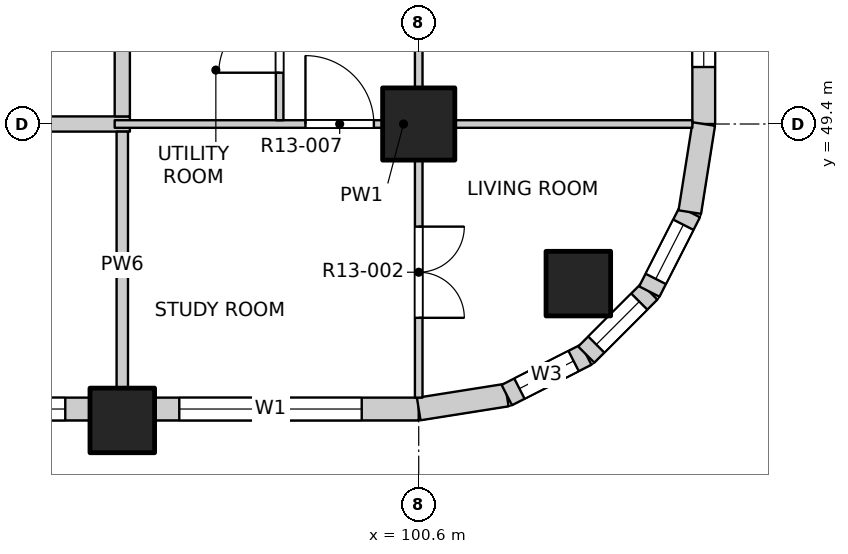
"""IFC4 building model, lengths in metres.
Left out: names, types, materials, properties, quantities, classifications, styles, units other than length and angle.
Written with IfcOpenShell. Run it as: python <this file> out.ifc"""

import sys

from ifc_helpers import new_model, si_unit, direction, frame, frame_2d, origin, origin_2d, place, context, subcontext, project, spatial, rectangle, extrude, element, fill, save


model = new_model("IFC4")
c1 = context("Model", 3, precision=1e-05, world=origin(), true_north=direction((0.0, 1.0)))
c2 = subcontext(c1, "Body", "Model", "MODEL_VIEW")
j1 = project(units=[si_unit("LENGTHUNIT", "METRE"), si_unit("PLANEANGLEUNIT", "RADIAN")], contexts=[c1])
p1 = place(None, origin())
s1 = spatial("IfcSite", under=j1, at=p1, CompositionType="ELEMENT")
p2 = place(p1, origin())
s2 = spatial("IfcBuilding", under=s1, at=p2, CompositionType="ELEMENT")
p3 = place(p2, frame((0.0, 0.0, 140.7)))
s3 = spatial("IfcBuildingStorey", under=s2, at=p3, CompositionType="ELEMENT", Elevation=140.7)
for number, where, z_axis, x_axis in (
    (1, (102.7, 47.3, -0.25), (0.0, 0.0, 1.0), (1.0, 0.0, 0.0)),
    (2, (96.7, 45.5, -0.25), (0.0, 0.0, 1.0), (1.0, 0.0, 0.0)),
):
    element("IfcColumn", number, at=place(p3, frame(where, z_axis=z_axis, x_axis=x_axis)), inside=s3, PredefinedType="COLUMN", context=c2, shape_type="SweptSolid", body=[
        extrude(rectangle(XDim=0.85, YDim=0.85, at=origin_2d()), origin(), (0.0, 0.0, 1.0), 3.35),
    ])
p4 = place(p3, frame((100.6, 49.4, -0.25), z_axis=(0.0, 0.0, 1.0), x_axis=(1.0, 0.0, 0.0)))
e3 = element("IfcColumn", 3, at=p4, inside=s3, PredefinedType="COLUMN", context=c2, shape_type="SweptSolid", body=[
    extrude(rectangle(XDim=0.95, YDim=0.95, at=origin_2d()), origin(), (0.0, 0.0, 1.0), 3.35),
])
p5 = place(p3, frame((89.325, 45.65, 0.0), z_axis=(0.0, 0.0, 1.0), x_axis=(1.0, 0.0, 0.0)))
e4 = element("IfcWall", 4, at=p5, inside=s3, PredefinedType="SOLIDWALL", context=c2, shape_type="SweptSolid", body=[
    extrude(rectangle(XDim=6.95, YDim=0.3, at=frame_2d((3.475, 0.0))), origin(), (0.0, 0.0, 1.0), 3.1),
])
p6 = place(p5, frame((0.325, 0.0, 0.9)))
e5 = element("IfcOpeningElement", 5, at=p6, cuts=e4, PredefinedType="OPENING", context=c2, shape_type="SweptSolid", body=[
    extrude(rectangle(XDim=2.4, YDim=1.8, at=frame_2d((1.2, 0.9))), frame((0.0, 0.16, 0.0), z_axis=(0.0, -1.0, 0.0), x_axis=(1.0, 0.0, 0.0)), (0.0, 0.0, 1.0), 0.32),
])
p7 = place(p5, frame((4.225, 0.0, 0.9)))
e6 = element("IfcOpeningElement", 6, at=p7, cuts=e4, PredefinedType="OPENING", context=c2, shape_type="SweptSolid", body=[
    extrude(rectangle(XDim=2.4, YDim=1.8, at=frame_2d((1.2, 0.9))), frame((0.0, 0.16, 0.0), z_axis=(0.0, -1.0, 0.0), x_axis=(1.0, 0.0, 0.0)), (0.0, 0.0, 1.0), 0.32),
])
p8 = place(p3, frame((97.125, 45.65, 0.0), z_axis=(0.0, 0.0, 1.0), x_axis=(1.0, 0.0, 0.0)))
e7 = element("IfcWall", 7, at=p8, inside=s3, PredefinedType="SOLIDWALL", context=c2, shape_type="SweptSolid", body=[
    extrude(rectangle(XDim=3.475, YDim=0.3, at=frame_2d((1.738, 0.0))), origin(), (0.0, 0.0, 1.0), 3.1),
])
p9 = place(p8, frame((0.325, 0.0, 0.9)))
e8 = element("IfcOpeningElement", 8, at=p9, cuts=e7, PredefinedType="OPENING", context=c2, shape_type="SweptSolid", body=[
    extrude(rectangle(XDim=2.4, YDim=1.8, at=frame_2d((1.2, 0.9))), frame((0.0, 0.16, 0.0), z_axis=(0.0, -1.0, 0.0), x_axis=(1.0, 0.0, 0.0)), (0.0, 0.0, 1.0), 0.32),
])
p10 = place(p3, frame((104.35, 49.4, 0.0), z_axis=(0.0, 0.0, 1.0), x_axis=(0.0, 1.0, 0.0)))
e9 = element("IfcWall", 9, at=p10, inside=s3, PredefinedType="SOLIDWALL", context=c2, shape_type="SweptSolid", body=[
    extrude(rectangle(XDim=3.475, YDim=0.3, at=frame_2d((1.738, 0.0))), origin(), (0.0, 0.0, 1.0), 3.1),
])
p11 = place(p10, frame((0.75, 0.0, 0.9)))
e10 = element("IfcOpeningElement", 10, at=p11, cuts=e9, PredefinedType="OPENING", context=c2, shape_type="SweptSolid", body=[
    extrude(rectangle(XDim=2.4, YDim=1.8, at=frame_2d((1.2, 0.9))), frame((0.0, 0.16, 0.0), z_axis=(0.0, -1.0, 0.0), x_axis=(1.0, 0.0, 0.0)), (0.0, 0.0, 1.0), 0.32),
])
p12 = place(p3, frame((100.6, 45.65, 0.0), z_axis=(0.0, 0.0, 1.0), x_axis=(0.987678452879, 0.156496880861, 0.0)))
e11 = element("IfcWall", 11, at=p12, inside=s3, PredefinedType="SOLIDWALL", context=c2, shape_type="SweptSolid", body=[
    extrude(rectangle(XDim=1.173, YDim=0.3, at=frame_2d((0.586, 0.0))), origin(), (0.0, 0.0, 1.0), 3.1),
])
p13 = place(p3, frame((101.759, 45.833, 0.0), z_axis=(0.0, 0.0, 1.0), x_axis=(0.890988677504, 0.454025524128, 0.0)))
e12 = element("IfcWall", 12, at=p13, inside=s3, PredefinedType="SOLIDWALL", context=c2, shape_type="SweptSolid", body=[
    extrude(rectangle(XDim=1.173, YDim=0.3, at=frame_2d((0.587, 0.0))), origin(), (0.0, 0.0, 1.0), 3.1),
])
p14 = place(p13, frame((0.187, 0.0, 0.9)))
e13 = element("IfcOpeningElement", 13, at=p14, cuts=e12, PredefinedType="OPENING", context=c2, shape_type="SweptSolid", body=[
    extrude(rectangle(XDim=0.8, YDim=1.2, at=frame_2d((0.4, 0.6))), frame((0.0, 0.16, 0.0), z_axis=(0.0, -1.0, 0.0), x_axis=(1.0, 0.0, 0.0)), (0.0, 0.0, 1.0), 0.32),
])
p15 = place(p3, frame((102.804, 46.366, 0.0), z_axis=(0.0, 0.0, 1.0), x_axis=(0.707106781187, 0.707106781187, 0.0)))
e14 = element("IfcWall", 14, at=p15, inside=s3, PredefinedType="SOLIDWALL", context=c2, shape_type="SweptSolid", body=[
    extrude(rectangle(XDim=1.173, YDim=0.3, at=frame_2d((0.586, 0.0))), origin(), (0.0, 0.0, 1.0), 3.1),
])
p16 = place(p15, frame((0.187, 0.0, 0.9)))
e15 = element("IfcOpeningElement", 15, at=p16, cuts=e14, PredefinedType="OPENING", context=c2, shape_type="SweptSolid", body=[
    extrude(rectangle(XDim=0.8, YDim=1.2, at=frame_2d((0.4, 0.6))), frame((0.0, 0.16, 0.0), z_axis=(0.0, -1.0, 0.0), x_axis=(1.0, 0.0, 0.0)), (0.0, 0.0, 1.0), 0.32),
])
p17 = place(p3, frame((103.634, 47.196, 0.0), z_axis=(0.0, 0.0, 1.0), x_axis=(0.454025524128, 0.890988677504, 0.0)))
e16 = element("IfcWall", 16, at=p17, inside=s3, PredefinedType="SOLIDWALL", context=c2, shape_type="SweptSolid", body=[
    extrude(rectangle(XDim=1.173, YDim=0.3, at=frame_2d((0.587, 0.0))), origin(), (0.0, 0.0, 1.0), 3.1),
])
p18 = place(p17, frame((0.187, 0.0, 0.9)))
e17 = element("IfcOpeningElement", 17, at=p18, cuts=e16, PredefinedType="OPENING", context=c2, shape_type="SweptSolid", body=[
    extrude(rectangle(XDim=0.8, YDim=1.2, at=frame_2d((0.4, 0.6))), frame((0.0, 0.16, 0.0), z_axis=(0.0, -1.0, 0.0), x_axis=(1.0, 0.0, 0.0)), (0.0, 0.0, 1.0), 0.32),
])
p19 = place(p3, frame((104.167, 48.241, 0.0), z_axis=(0.0, 0.0, 1.0), x_axis=(0.156496880861, 0.987678452879, 0.0)))
e18 = element("IfcWall", 18, at=p19, inside=s3, PredefinedType="SOLIDWALL", context=c2, shape_type="SweptSolid", body=[
    extrude(rectangle(XDim=1.173, YDim=0.3, at=frame_2d((0.586, 0.0))), origin(), (0.0, 0.0, 1.0), 3.1),
])
p20 = place(p3, frame((73.2, 49.4, 0.0), z_axis=(0.0, 0.0, 1.0), x_axis=(1.0, 0.0, 0.0)))
e19 = element("IfcWall", 19, at=p20, inside=s3, PredefinedType="PARTITIONING", context=c2, shape_type="SweptSolid", body=[
    extrude(rectangle(XDim=23.6, YDim=0.2, at=frame_2d((11.8, 0.0))), origin(), (0.0, 0.0, 1.0), 3.1),
])
p21 = place(p20, frame((2.225, 0.0, 0.0)))
e20 = element("IfcOpeningElement", 20, at=p21, cuts=e19, PredefinedType="OPENING", context=c2, shape_type="SweptSolid", body=[
    extrude(rectangle(XDim=1.2, YDim=2.1, at=frame_2d((0.6, 1.05))), frame((0.0, 0.11, 0.0), z_axis=(0.0, -1.0, 0.0), x_axis=(1.0, 0.0, 0.0)), (0.0, 0.0, 1.0), 0.22),
])
p22 = place(p20, frame((12.375, 0.0, 0.0)))
e21 = element("IfcOpeningElement", 21, at=p22, cuts=e19, PredefinedType="OPENING", context=c2, shape_type="SweptSolid", body=[
    extrude(rectangle(XDim=1.2, YDim=2.1, at=frame_2d((0.6, 1.05))), frame((0.0, 0.11, 0.0), z_axis=(0.0, -1.0, 0.0), x_axis=(1.0, 0.0, 0.0)), (0.0, 0.0, 1.0), 0.22),
])
p23 = place(p20, frame((20.175, 0.0, 0.0)))
e22 = element("IfcOpeningElement", 22, at=p23, cuts=e19, PredefinedType="OPENING", context=c2, shape_type="SweptSolid", body=[
    extrude(rectangle(XDim=1.2, YDim=2.1, at=frame_2d((0.6, 1.05))), frame((0.0, 0.11, 0.0), z_axis=(0.0, -1.0, 0.0), x_axis=(1.0, 0.0, 0.0)), (0.0, 0.0, 1.0), 0.22),
])
p24 = place(p3, frame((96.6, 49.4, 0.0), z_axis=(0.0, 0.0, 1.0), x_axis=(1.0, 0.0, 0.0)))
e23 = element("IfcWall", 23, at=p24, inside=s3, PredefinedType="PARTITIONING", context=c2, shape_type="SweptSolid", body=[
    extrude(rectangle(XDim=7.6, YDim=0.1, at=frame_2d((3.8, 0.0))), origin(), (0.0, 0.0, 1.0), 3.1),
])
p25 = place(p24, frame((2.51, 0.0, 0.0)))
e24 = element("IfcOpeningElement", 24, at=p25, cuts=e23, PredefinedType="OPENING", context=c2, shape_type="SweptSolid", body=[
    extrude(rectangle(XDim=0.9, YDim=2.1, at=frame_2d((0.45, 1.05))), frame((0.0, 0.06, 0.0), z_axis=(0.0, -1.0, 0.0), x_axis=(1.0, 0.0, 0.0)), (0.0, 0.0, 1.0), 0.12),
])
p26 = place(p3, frame((96.7, 45.8, 0.0), z_axis=(0.0, 0.0, 1.0), x_axis=(0.0, 1.0, 0.0)))
e25 = element("IfcWall", 25, at=p26, inside=s3, PredefinedType="PARTITIONING", context=c2, shape_type="SweptSolid", body=[
    extrude(rectangle(XDim=3.5, YDim=0.15, at=frame_2d((1.75, 0.0))), origin(), (0.0, 0.0, 1.0), 3.1),
])
p27 = place(p3, frame((96.7, 49.5, 0.0), z_axis=(0.0, 0.0, 1.0), x_axis=(0.0, 1.0, 0.0)))
e26 = element("IfcWall", 26, at=p27, inside=s3, PredefinedType="PARTITIONING", context=c2, shape_type="SweptSolid", body=[
    extrude(rectangle(XDim=34.7, YDim=0.2, at=frame_2d((17.35, 0.0))), origin(), (0.0, 0.0, 1.0), 3.1),
])
p28 = place(p27, frame((3.675, 0.0, 0.0)))
e27 = element("IfcOpeningElement", 27, at=p28, cuts=e26, PredefinedType="OPENING", context=c2, shape_type="SweptSolid", body=[
    extrude(rectangle(XDim=1.0, YDim=2.1, at=frame_2d((0.5, 1.05))), frame((0.0, 0.11, 0.0), z_axis=(0.0, -1.0, 0.0), x_axis=(1.0, 0.0, 0.0)), (0.0, 0.0, 1.0), 0.22),
])
p29 = place(p27, frame((21.725, 0.0, 0.0)))
e28 = element("IfcOpeningElement", 28, at=p29, cuts=e26, PredefinedType="OPENING", context=c2, shape_type="SweptSolid", body=[
    extrude(rectangle(XDim=1.0, YDim=2.1, at=frame_2d((0.5, 1.05))), frame((0.0, 0.11, 0.0), z_axis=(0.0, -1.0, 0.0), x_axis=(1.0, 0.0, 0.0)), (0.0, 0.0, 1.0), 0.22),
])
p30 = place(p27, frame((29.125, 0.0, 0.0)))
e29 = element("IfcOpeningElement", 29, at=p30, cuts=e26, PredefinedType="OPENING", context=c2, shape_type="SweptSolid", body=[
    extrude(rectangle(XDim=1.0, YDim=2.1, at=frame_2d((0.5, 1.05))), frame((0.0, 0.11, 0.0), z_axis=(0.0, -1.0, 0.0), x_axis=(1.0, 0.0, 0.0)), (0.0, 0.0, 1.0), 0.22),
])
p31 = place(p3, frame((98.77, 49.45, 0.0), z_axis=(0.0, 0.0, 1.0), x_axis=(0.0, 1.0, 0.0)))
e30 = element("IfcWall", 30, at=p31, inside=s3, PredefinedType="PARTITIONING", context=c2, shape_type="SweptSolid", body=[
    extrude(rectangle(XDim=4.85, YDim=0.1, at=frame_2d((2.425, 0.0))), origin(), (0.0, 0.0, 1.0), 3.1),
])
p32 = place(p31, frame((0.625, 0.0, 0.0)))
e31 = element("IfcOpeningElement", 31, at=p32, cuts=e30, PredefinedType="OPENING", context=c2, shape_type="SweptSolid", body=[
    extrude(rectangle(XDim=0.8, YDim=2.1, at=frame_2d((0.4, 1.05))), frame((0.0, 0.06, 0.0), z_axis=(0.0, -1.0, 0.0), x_axis=(1.0, 0.0, 0.0)), (0.0, 0.0, 1.0), 0.12),
])
p33 = place(p31, frame((3.05, 0.0, 0.0)))
e32 = element("IfcOpeningElement", 32, at=p33, cuts=e30, PredefinedType="OPENING", context=c2, shape_type="SweptSolid", body=[
    extrude(rectangle(XDim=0.9, YDim=2.1, at=frame_2d((0.45, 1.05))), frame((0.0, 0.06, 0.0), z_axis=(0.0, -1.0, 0.0), x_axis=(1.0, 0.0, 0.0)), (0.0, 0.0, 1.0), 0.12),
])
p34 = place(p3, frame((100.6, 45.8, 0.0), z_axis=(0.0, 0.0, 1.0), x_axis=(0.0, 1.0, 0.0)))
e33 = element("IfcWall", 33, at=p34, inside=s3, PredefinedType="PARTITIONING", context=c2, shape_type="SweptSolid", body=[
    extrude(rectangle(XDim=38.4, YDim=0.1, at=frame_2d((19.2, 0.0))), origin(), (0.0, 0.0, 1.0), 3.1),
])
p35 = place(p34, frame((1.05, 0.0, 0.0)))
e34 = element("IfcOpeningElement", 34, at=p35, cuts=e33, PredefinedType="OPENING", context=c2, shape_type="SweptSolid", body=[
    extrude(rectangle(XDim=1.2, YDim=2.1, at=frame_2d((0.6, 1.05))), frame((0.0, 0.06, 0.0), z_axis=(0.0, -1.0, 0.0), x_axis=(1.0, 0.0, 0.0)), (0.0, 0.0, 1.0), 0.12),
])
p36 = place(p34, frame((5.1, 0.0, 0.0)))
e35 = element("IfcOpeningElement", 35, at=p36, cuts=e33, PredefinedType="OPENING", context=c2, shape_type="SweptSolid", body=[
    extrude(rectangle(XDim=0.9, YDim=2.1, at=frame_2d((0.45, 1.05))), frame((0.0, 0.06, 0.0), z_axis=(0.0, -1.0, 0.0), x_axis=(1.0, 0.0, 0.0)), (0.0, 0.0, 1.0), 0.12),
])
p37 = place(p34, frame((9.0, 0.0, 0.0)))
e36 = element("IfcOpeningElement", 36, at=p37, cuts=e33, PredefinedType="OPENING", context=c2, shape_type="SweptSolid", body=[
    extrude(rectangle(XDim=0.9, YDim=2.1, at=frame_2d((0.45, 1.05))), frame((0.0, 0.06, 0.0), z_axis=(0.0, -1.0, 0.0), x_axis=(1.0, 0.0, 0.0)), (0.0, 0.0, 1.0), 0.12),
])
p38 = place(p34, frame((12.9, 0.0, 0.0)))
e37 = element("IfcOpeningElement", 37, at=p38, cuts=e33, PredefinedType="OPENING", context=c2, shape_type="SweptSolid", body=[
    extrude(rectangle(XDim=0.9, YDim=2.1, at=frame_2d((0.45, 1.05))), frame((0.0, 0.06, 0.0), z_axis=(0.0, -1.0, 0.0), x_axis=(1.0, 0.0, 0.0)), (0.0, 0.0, 1.0), 0.12),
])
p39 = place(p34, frame((16.8, 0.0, 0.0)))
e38 = element("IfcOpeningElement", 38, at=p39, cuts=e33, PredefinedType="OPENING", context=c2, shape_type="SweptSolid", body=[
    extrude(rectangle(XDim=0.9, YDim=2.1, at=frame_2d((0.45, 1.05))), frame((0.0, 0.06, 0.0), z_axis=(0.0, -1.0, 0.0), x_axis=(1.0, 0.0, 0.0)), (0.0, 0.0, 1.0), 0.12),
])
p40 = place(p34, frame((20.7, 0.0, 0.0)))
e39 = element("IfcOpeningElement", 39, at=p40, cuts=e33, PredefinedType="OPENING", context=c2, shape_type="SweptSolid", body=[
    extrude(rectangle(XDim=0.9, YDim=2.1, at=frame_2d((0.45, 1.05))), frame((0.0, 0.06, 0.0), z_axis=(0.0, -1.0, 0.0), x_axis=(1.0, 0.0, 0.0)), (0.0, 0.0, 1.0), 0.12),
])
p41 = place(p34, frame((24.6, 0.0, 0.0)))
e40 = element("IfcOpeningElement", 40, at=p41, cuts=e33, PredefinedType="OPENING", context=c2, shape_type="SweptSolid", body=[
    extrude(rectangle(XDim=0.9, YDim=2.1, at=frame_2d((0.45, 1.05))), frame((0.0, 0.06, 0.0), z_axis=(0.0, -1.0, 0.0), x_axis=(1.0, 0.0, 0.0)), (0.0, 0.0, 1.0), 0.12),
])
p42 = place(p34, frame((28.5, 0.0, 0.0)))
e41 = element("IfcOpeningElement", 41, at=p42, cuts=e33, PredefinedType="OPENING", context=c2, shape_type="SweptSolid", body=[
    extrude(rectangle(XDim=0.9, YDim=2.1, at=frame_2d((0.45, 1.05))), frame((0.0, 0.06, 0.0), z_axis=(0.0, -1.0, 0.0), x_axis=(1.0, 0.0, 0.0)), (0.0, 0.0, 1.0), 0.12),
])
p43 = place(p34, frame((32.4, 0.0, 0.0)))
e42 = element("IfcOpeningElement", 42, at=p43, cuts=e33, PredefinedType="OPENING", context=c2, shape_type="SweptSolid", body=[
    extrude(rectangle(XDim=0.9, YDim=2.1, at=frame_2d((0.45, 1.05))), frame((0.0, 0.06, 0.0), z_axis=(0.0, -1.0, 0.0), x_axis=(1.0, 0.0, 0.0)), (0.0, 0.0, 1.0), 0.12),
])
p44 = place(p34, frame((36.15, 0.0, 0.0)))
e43 = element("IfcOpeningElement", 43, at=p44, cuts=e33, PredefinedType="OPENING", context=c2, shape_type="SweptSolid", body=[
    extrude(rectangle(XDim=1.2, YDim=2.1, at=frame_2d((0.6, 1.05))), frame((0.0, 0.06, 0.0), z_axis=(0.0, -1.0, 0.0), x_axis=(1.0, 0.0, 0.0)), (0.0, 0.0, 1.0), 0.12),
])
p45 = place(p7, origin())
e44 = element("IfcWindow", 44, at=p45, inside=s3, PartitioningType="DOUBLE_PANEL_VERTICAL", PredefinedType="WINDOW", context=c2, shape_type="SweptSolid", body=[
    extrude(rectangle(XDim=2.4, YDim=1.8, at=frame_2d((1.2, 0.9))), frame((0.0, 0.03, 0.0), z_axis=(0.0, -1.0, 0.0), x_axis=(1.0, 0.0, 0.0)), (0.0, 0.0, 1.0), 0.06),
])
fill(e6, e44)
p46 = place(p9, origin())
e45 = element("IfcWindow", 45, at=p46, inside=s3, PartitioningType="DOUBLE_PANEL_VERTICAL", PredefinedType="WINDOW", context=c2, shape_type="SweptSolid", body=[
    extrude(rectangle(XDim=2.4, YDim=1.8, at=frame_2d((1.2, 0.9))), frame((0.0, 0.03, 0.0), z_axis=(0.0, -1.0, 0.0), x_axis=(1.0, 0.0, 0.0)), (0.0, 0.0, 1.0), 0.06),
])
fill(e8, e45)
p47 = place(p11, origin())
e46 = element("IfcWindow", 46, at=p47, inside=s3, PartitioningType="DOUBLE_PANEL_VERTICAL", PredefinedType="WINDOW", context=c2, shape_type="SweptSolid", body=[
    extrude(rectangle(XDim=2.4, YDim=1.8, at=frame_2d((1.2, 0.9))), frame((0.0, 0.03, 0.0), z_axis=(0.0, -1.0, 0.0), x_axis=(1.0, 0.0, 0.0)), (0.0, 0.0, 1.0), 0.06),
])
fill(e10, e46)
p48 = place(p14, origin())
e47 = element("IfcWindow", 47, at=p48, inside=s3, PartitioningType="SINGLE_PANEL", PredefinedType="WINDOW", context=c2, shape_type="SweptSolid", body=[
    extrude(rectangle(XDim=0.8, YDim=1.2, at=frame_2d((0.4, 0.6))), frame((0.0, 0.03, 0.0), z_axis=(0.0, -1.0, 0.0), x_axis=(1.0, 0.0, 0.0)), (0.0, 0.0, 1.0), 0.06),
])
fill(e13, e47)
p49 = place(p16, origin())
e48 = element("IfcWindow", 48, at=p49, inside=s3, PartitioningType="SINGLE_PANEL", PredefinedType="WINDOW", context=c2, shape_type="SweptSolid", body=[
    extrude(rectangle(XDim=0.8, YDim=1.2, at=frame_2d((0.4, 0.6))), frame((0.0, 0.03, 0.0), z_axis=(0.0, -1.0, 0.0), x_axis=(1.0, 0.0, 0.0)), (0.0, 0.0, 1.0), 0.06),
])
fill(e15, e48)
p50 = place(p18, origin())
e49 = element("IfcWindow", 49, at=p50, inside=s3, PartitioningType="SINGLE_PANEL", PredefinedType="WINDOW", context=c2, shape_type="SweptSolid", body=[
    extrude(rectangle(XDim=0.8, YDim=1.2, at=frame_2d((0.4, 0.6))), frame((0.0, 0.03, 0.0), z_axis=(0.0, -1.0, 0.0), x_axis=(1.0, 0.0, 0.0)), (0.0, 0.0, 1.0), 0.06),
])
fill(e17, e49)
p51 = place(p35, origin())
e50 = element("IfcDoor", 50, at=p51, inside=s3, OperationType="DOUBLE_DOOR_SINGLE_SWING", PredefinedType="DOOR", context=c2, shape_type="SweptSolid", body=[
    extrude(rectangle(XDim=1.2, YDim=2.1, at=frame_2d((0.6, 1.05))), frame((0.0, 0.025, 0.0), z_axis=(0.0, -1.0, 0.0), x_axis=(1.0, 0.0, 0.0)), (0.0, 0.0, 1.0), 0.05),
])
fill(e34, e50)
p52 = place(p25, origin())
e51 = element("IfcDoor", 51, at=p52, inside=s3, OperationType="SINGLE_SWING_LEFT", PredefinedType="DOOR", context=c2, shape_type="SweptSolid", body=[
    extrude(rectangle(XDim=0.9, YDim=2.1, at=frame_2d((0.45, 1.05))), frame((0.0, 0.025, 0.0), z_axis=(0.0, -1.0, 0.0), x_axis=(1.0, 0.0, 0.0)), (0.0, 0.0, 1.0), 0.05),
])
fill(e24, e51)
p53 = place(p32, origin())
e52 = element("IfcDoor", 52, at=p53, inside=s3, OperationType="SINGLE_SWING_LEFT", PredefinedType="DOOR", context=c2, shape_type="SweptSolid", body=[
    extrude(rectangle(XDim=0.8, YDim=2.1, at=frame_2d((0.4, 1.05))), frame((0.0, 0.025, 0.0), z_axis=(0.0, -1.0, 0.0), x_axis=(1.0, 0.0, 0.0)), (0.0, 0.0, 1.0), 0.05),
])
fill(e31, e52)
save(model, sys.argv[1])
